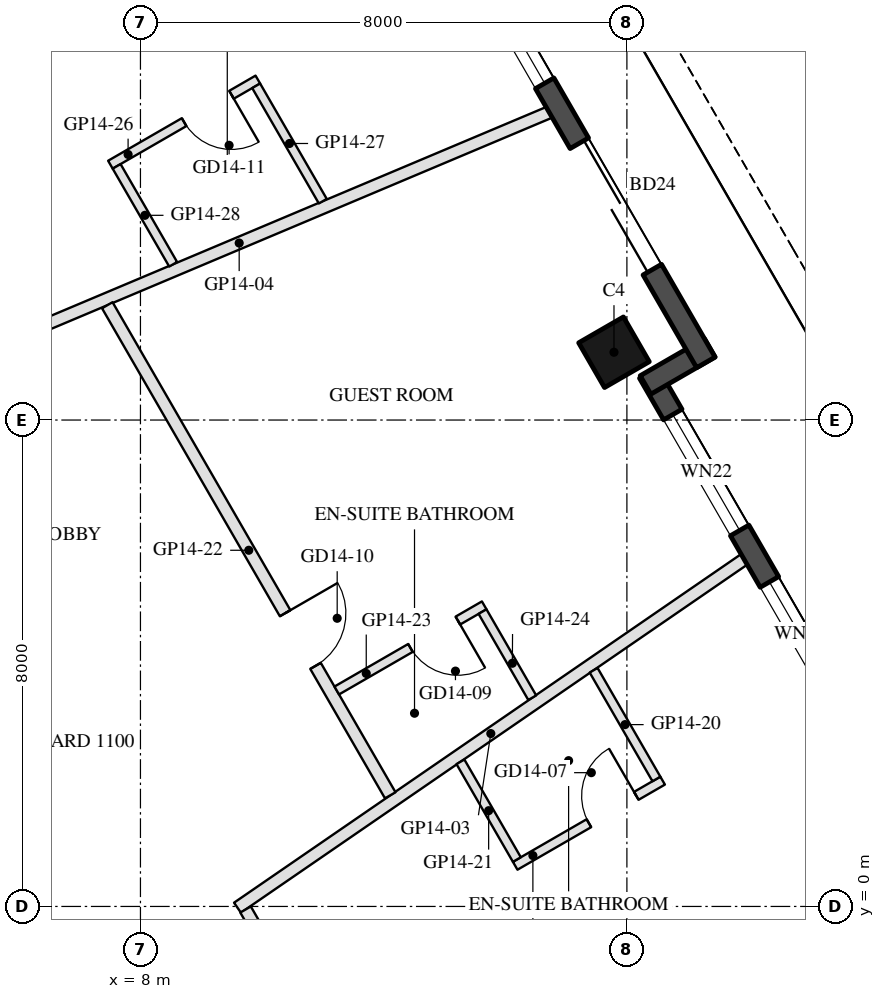
"""IFC4 building model, lengths in metres.
Left out: names, types, materials, properties, quantities, classifications, styles, units other than length and angle.
Written with IfcOpenShell. Run it as: python <this file> out.ifc"""

import sys

from ifc_helpers import new_model, si_unit, direction, frame, frame_2d, origin, origin_2d, place, context, subcontext, project, spatial, rectangle, hollow_rectangle, extrude, element, fill, save


model = new_model("IFC4")
c1 = context("Model", 3, precision=1e-05, world=origin(), true_north=direction((0.0, 1.0)))
c2 = subcontext(c1, "Body", "Model", "MODEL_VIEW")
j1 = project(units=[si_unit("LENGTHUNIT", "METRE"), si_unit("PLANEANGLEUNIT", "RADIAN")], contexts=[c1])
p1 = place(None, origin())
s1 = spatial("IfcSite", under=j1, at=p1, CompositionType="ELEMENT")
p2 = place(p1, origin())
s2 = spatial("IfcBuilding", under=s1, at=p2, CompositionType="ELEMENT")
p3 = place(p2, frame((0.0, 0.0, 165.1)))
s3 = spatial("IfcBuildingStorey", under=s2, at=p3, CompositionType="ELEMENT", Elevation=165.1)
p4 = place(p3, frame((15.788, 9.115, 0.0), z_axis=(0.0, 0.0, 1.0), x_axis=(-0.5, 0.866025403784, 0.0)))
e1 = element("IfcColumn", 1, at=p4, inside=s3, PredefinedType="COLUMN", context=c2, shape_type="SweptSolid", body=[
    extrude(hollow_rectangle(XDim=0.85, YDim=0.85, WallThickness=0.04, at=origin_2d()), origin(), (0.0, 0.0, 1.0), 3.7),
])
p5 = place(p3, frame((19.729, 2.938, 0.0), z_axis=(0.0, 0.0, 1.0), x_axis=(-0.499976430342, 0.866039011305, 0.0)))
e2 = element("IfcWall", 2, at=p5, inside=s3, PredefinedType="SOLIDWALL", context=c2, shape_type="SweptSolid", body=[
    extrude(rectangle(XDim=6.74, YDim=0.35, at=frame_2d((3.37, 0.0))), origin(), (0.0, 0.0, 1.0), 3.55),
])
p6 = place(p5, frame((0.77, 0.0, 0.3)))
e3 = element("IfcOpeningElement", 3, at=p6, cuts=e2, PredefinedType="OPENING", context=c2, shape_type="SweptSolid", body=[
    extrude(rectangle(XDim=2.0, YDim=2.65, at=frame_2d((1.0, 1.325))), frame((0.0, 0.185, 0.0), z_axis=(0.0, -1.0, 0.0), x_axis=(1.0, 0.0, 0.0)), (0.0, 0.0, 1.0), 0.37),
])
p7 = place(p5, frame((3.749, 0.0, 0.3)))
e4 = element("IfcOpeningElement", 4, at=p7, cuts=e2, PredefinedType="OPENING", context=c2, shape_type="SweptSolid", body=[
    extrude(rectangle(XDim=2.2, YDim=2.65, at=frame_2d((1.1, 1.325))), frame((0.0, 0.185, 0.0), z_axis=(0.0, -1.0, 0.0), x_axis=(1.0, 0.0, 0.0)), (0.0, 0.0, 1.0), 0.37),
])
p8 = place(p3, frame((16.306, 8.577, 0.0), z_axis=(0.0, 0.0, 1.0), x_axis=(0.866092288191, 0.499884134912, 0.0)))
e5 = element("IfcWall", 5, at=p8, inside=s3, PredefinedType="SOLIDWALL", context=c2, shape_type="SweptSolid", body=[
    extrude(rectangle(XDim=1.22, YDim=0.35, at=frame_2d((0.61, 0.0))), origin(), (0.0, 0.0, 1.0), 3.55),
])
p9 = place(p3, frame((17.299, 8.948, 0.0), z_axis=(0.0, 0.0, 1.0), x_axis=(-0.500010041276, 0.866019606374, 0.0)))
e6 = element("IfcWall", 6, at=p9, inside=s3, PredefinedType="SOLIDWALL", context=c2, shape_type="SweptSolid", body=[
    extrude(rectangle(XDim=9.7, YDim=0.35, at=frame_2d((4.85, 0.0))), origin(), (0.0, 0.0, 1.0), 3.55),
])
p10 = place(p9, frame((1.762, 0.0, 0.0)))
e7 = element("IfcOpeningElement", 7, at=p10, cuts=e6, PredefinedType="OPENING", context=c2, shape_type="SweptSolid", body=[
    extrude(rectangle(XDim=2.4, YDim=2.4, at=frame_2d((1.2, 1.2))), frame((0.0, 0.185, 0.0), z_axis=(0.0, -1.0, 0.0), x_axis=(1.0, 0.0, 0.0)), (0.0, 0.0, 1.0), 0.37),
])
p11 = place(p9, frame((5.301, 0.0, 0.3)))
e8 = element("IfcOpeningElement", 8, at=p11, cuts=e6, PredefinedType="OPENING", context=c2, shape_type="SweptSolid", body=[
    extrude(rectangle(XDim=2.7, YDim=2.65, at=frame_2d((1.35, 1.325))), frame((0.0, 0.185, 0.0), z_axis=(0.0, -1.0, 0.0), x_axis=(1.0, 0.0, 0.0)), (0.0, 0.0, 1.0), 0.37),
])
p12 = place(p3, frame((17.928, 5.708, 0.0), z_axis=(0.0, 0.0, 1.0), x_axis=(-0.824041924199, -0.566528822887, 0.0)))
e9 = element("IfcWall", 9, at=p12, inside=s3, PredefinedType="PARTITIONING", context=c2, shape_type="SweptSolid", body=[
    extrude(rectangle(XDim=10.111, YDim=0.2, at=frame_2d((5.056, 0.0))), origin(), (0.0, 0.0, 1.0), 2.95),
])
p13 = place(p3, frame((14.722, 13.061, 0.0), z_axis=(0.0, 0.0, 1.0), x_axis=(-0.921447968583, -0.388501790465, 0.0)))
e10 = element("IfcWall", 10, at=p13, inside=s3, PredefinedType="PARTITIONING", context=c2, shape_type="SweptSolid", body=[
    extrude(rectangle(XDim=11.066, YDim=0.2, at=frame_2d((5.533, 0.0))), origin(), (0.0, 0.0, 1.0), 2.95),
])
p14 = place(p3, frame((9.729, -0.051, 0.0), z_axis=(0.0, 0.0, 1.0), x_axis=(0.500005339912, -0.866022320763, 0.0)))
e11 = element("IfcWall", 11, at=p14, inside=s3, PredefinedType="PARTITIONING", context=c2, shape_type="SweptSolid", body=[
    extrude(rectangle(XDim=5.08, YDim=0.2, at=frame_2d((2.54, 0.0))), origin(), (0.0, 0.0, 1.0), 2.95),
])
p15 = place(p14, frame((2.04, 0.0, 0.0)))
e12 = element("IfcOpeningElement", 12, at=p15, cuts=e11, PredefinedType="OPENING", context=c2, shape_type="SweptSolid", body=[
    extrude(rectangle(XDim=1.0, YDim=2.1, at=frame_2d((0.5, 1.05))), frame((0.0, 0.11, 0.0), z_axis=(0.0, -1.0, 0.0), x_axis=(1.0, 0.0, 0.0)), (0.0, 0.0, 1.0), 0.22),
])
p16 = place(p3, frame((14.163, 0.669, 0.0), z_axis=(0.0, 0.0, 1.0), x_axis=(0.866056369097, 0.49994636267, 0.0)))
e13 = element("IfcWall", 13, at=p16, inside=s3, PredefinedType="PARTITIONING", context=c2, shape_type="SweptSolid", body=[
    extrude(rectangle(XDim=2.8, YDim=0.15, at=frame_2d((1.4, 0.0))), origin(), (0.0, 0.0, 1.0), 3.55),
])
p17 = place(p16, frame((1.4, 0.0, 0.0)))
e14 = element("IfcOpeningElement", 14, at=p17, cuts=e13, PredefinedType="OPENING", context=c2, shape_type="SweptSolid", body=[
    extrude(rectangle(XDim=0.9, YDim=2.1, at=frame_2d((0.45, 1.05))), frame((0.0, 0.085, 0.0), z_axis=(0.0, -1.0, 0.0), x_axis=(1.0, 0.0, 0.0)), (0.0, 0.0, 1.0), 0.17),
])
p18 = place(p3, frame((16.485, 2.096, 0.0), z_axis=(0.0, 0.0, 1.0), x_axis=(-0.499991955492, 0.866030048233, 0.0)))
e15 = element("IfcWall", 15, at=p18, inside=s3, PredefinedType="PARTITIONING", context=c2, shape_type="SweptSolid", body=[
    extrude(rectangle(XDim=2.065, YDim=0.15, at=frame_2d((1.032, 0.0))), origin(), (0.0, 0.0, 1.0), 3.55),
])
p19 = place(p3, frame((14.19, 0.771, 0.0), z_axis=(0.0, 0.0, 1.0), x_axis=(-0.499972951856, 0.866041019474, 0.0)))
e16 = element("IfcWall", 16, at=p19, inside=s3, PredefinedType="PARTITIONING", context=c2, shape_type="SweptSolid", body=[
    extrude(rectangle(XDim=1.856, YDim=0.15, at=frame_2d((0.928, 0.0))), origin(), (0.0, 0.0, 1.0), 3.55),
])
p20 = place(p3, frame((7.455, 9.888, 0.0), z_axis=(0.0, 0.0, 1.0), x_axis=(0.499995688794, -0.866027892846, 0.0)))
e17 = element("IfcWall", 17, at=p20, inside=s3, PredefinedType="PARTITIONING", context=c2, shape_type="SweptSolid", body=[
    extrude(rectangle(XDim=9.307, YDim=0.2, at=frame_2d((4.654, 0.0))), origin(), (0.0, 0.0, 1.0), 2.95),
])
p21 = place(p20, frame((5.849, 0.0, 0.0)))
e18 = element("IfcOpeningElement", 18, at=p21, cuts=e17, PredefinedType="OPENING", context=c2, shape_type="SweptSolid", body=[
    extrude(rectangle(XDim=1.0, YDim=2.1, at=frame_2d((0.5, 1.05))), frame((0.0, 0.11, 0.0), z_axis=(0.0, -1.0, 0.0), x_axis=(1.0, 0.0, 0.0)), (0.0, 0.0, 1.0), 0.22),
])
p22 = place(p3, frame((13.653, 4.952, 0.0), z_axis=(0.0, 0.0, 1.0), x_axis=(-0.866034573852, -0.49998411664, 0.0)))
e19 = element("IfcWall", 19, at=p22, inside=s3, PredefinedType="PARTITIONING", context=c2, shape_type="SweptSolid", body=[
    extrude(rectangle(XDim=2.8, YDim=0.15, at=frame_2d((1.4, 0.0))), origin(), (0.0, 0.0, 1.0), 3.55),
])
p23 = place(p22, frame((0.5, 0.0, 0.0)))
e20 = element("IfcOpeningElement", 20, at=p23, cuts=e19, PredefinedType="OPENING", context=c2, shape_type="SweptSolid", body=[
    extrude(rectangle(XDim=0.9, YDim=2.1, at=frame_2d((0.45, 1.05))), frame((0.0, 0.085, 0.0), z_axis=(0.0, -1.0, 0.0), x_axis=(1.0, 0.0, 0.0)), (0.0, 0.0, 1.0), 0.17),
])
p24 = place(p3, frame((14.443, 3.433, 0.0), z_axis=(0.0, 0.0, 1.0), x_axis=(-0.499976608306, 0.866038908564, 0.0)))
e21 = element("IfcWall", 21, at=p24, inside=s3, PredefinedType="PARTITIONING", context=c2, shape_type="SweptSolid", body=[
    extrude(rectangle(XDim=1.635, YDim=0.15, at=frame_2d((0.818, 0.0))), origin(), (0.0, 0.0, 1.0), 2.95),
])
p25 = place(p3, frame((9.931, 13.6, 0.0), z_axis=(0.0, 0.0, 1.0), x_axis=(-0.866034573852, -0.49998411664, 0.0)))
e22 = element("IfcWall", 22, at=p25, inside=s3, PredefinedType="PARTITIONING", context=c2, shape_type="SweptSolid", body=[
    extrude(rectangle(XDim=2.8, YDim=0.15, at=frame_2d((1.4, 0.0))), origin(), (0.0, 0.0, 1.0), 3.55),
])
p26 = place(p25, frame((0.5, 0.0, 0.0)))
e23 = element("IfcOpeningElement", 23, at=p26, cuts=e22, PredefinedType="OPENING", context=c2, shape_type="SweptSolid", body=[
    extrude(rectangle(XDim=0.9, YDim=2.1, at=frame_2d((0.45, 1.05))), frame((0.0, 0.085, 0.0), z_axis=(0.0, -1.0, 0.0), x_axis=(1.0, 0.0, 0.0)), (0.0, 0.0, 1.0), 0.17),
])
p27 = place(p3, frame((10.999, 11.6, 0.0), z_axis=(0.0, 0.0, 1.0), x_axis=(-0.499937856693, 0.866061279267, 0.0)))
e24 = element("IfcWall", 24, at=p27, inside=s3, PredefinedType="PARTITIONING", context=c2, shape_type="SweptSolid", body=[
    extrude(rectangle(XDim=2.191, YDim=0.15, at=frame_2d((1.096, 0.0))), origin(), (0.0, 0.0, 1.0), 3.55),
])
p28 = place(p3, frame((8.538, 10.562, 0.0), z_axis=(0.0, 0.0, 1.0), x_axis=(-0.500036928615, 0.866004081989, 0.0)))
e25 = element("IfcWall", 25, at=p28, inside=s3, PredefinedType="PARTITIONING", context=c2, shape_type="SweptSolid", body=[
    extrude(rectangle(XDim=1.859, YDim=0.15, at=frame_2d((0.93, 0.0))), origin(), (0.0, 0.0, 1.0), 3.55),
])
p29 = place(p6, origin())
e26 = element("IfcWindow", 26, at=p29, inside=s3, PartitioningType="SINGLE_PANEL", PredefinedType="WINDOW", context=c2, shape_type="SweptSolid", body=[
    extrude(rectangle(XDim=2.0, YDim=2.65, at=frame_2d((1.0, 1.325))), frame((0.0, 0.03, 0.0), z_axis=(0.0, -1.0, 0.0), x_axis=(1.0, 0.0, 0.0)), (0.0, 0.0, 1.0), 0.06),
])
fill(e3, e26)
p30 = place(p7, origin())
e27 = element("IfcWindow", 27, at=p30, inside=s3, PartitioningType="SINGLE_PANEL", PredefinedType="WINDOW", context=c2, shape_type="SweptSolid", body=[
    extrude(rectangle(XDim=2.2, YDim=2.65, at=frame_2d((1.1, 1.325))), frame((0.0, 0.03, 0.0), z_axis=(0.0, -1.0, 0.0), x_axis=(1.0, 0.0, 0.0)), (0.0, 0.0, 1.0), 0.06),
])
fill(e4, e27)
p31 = place(p10, frame((2.4, 0.0, 0.0), z_axis=(0.0, 0.0, 1.0), x_axis=(-1.0, 0.0, 0.0)))
e28 = element("IfcDoor", 28, at=p31, inside=s3, OperationType="SLIDING_TO_LEFT", PredefinedType="DOOR", context=c2, shape_type="SweptSolid", body=[
    extrude(rectangle(XDim=2.4, YDim=2.4, at=frame_2d((1.2, 1.2))), frame((0.0, 0.025, 0.0), z_axis=(0.0, -1.0, 0.0), x_axis=(1.0, 0.0, 0.0)), (0.0, 0.0, 1.0), 0.05),
])
fill(e7, e28)
p32 = place(p11, origin())
e29 = element("IfcWindow", 29, at=p32, inside=s3, PartitioningType="SINGLE_PANEL", PredefinedType="WINDOW", context=c2, shape_type="SweptSolid", body=[
    extrude(rectangle(XDim=2.7, YDim=2.65, at=frame_2d((1.35, 1.325))), frame((0.0, 0.03, 0.0), z_axis=(0.0, -1.0, 0.0), x_axis=(1.0, 0.0, 0.0)), (0.0, 0.0, 1.0), 0.06),
])
fill(e8, e29)
p33 = place(p17, origin())
e30 = element("IfcDoor", 30, at=p33, inside=s3, OperationType="SINGLE_SWING_RIGHT", PredefinedType="DOOR", context=c2, shape_type="SweptSolid", body=[
    extrude(rectangle(XDim=0.9, YDim=2.1, at=frame_2d((0.45, 1.05))), frame((0.0, 0.025, 0.0), z_axis=(0.0, -1.0, 0.0), x_axis=(1.0, 0.0, 0.0)), (0.0, 0.0, 1.0), 0.05),
])
fill(e14, e30)
p34 = place(p23, origin())
e31 = element("IfcDoor", 31, at=p34, inside=s3, OperationType="SINGLE_SWING_LEFT", PredefinedType="DOOR", context=c2, shape_type="SweptSolid", body=[
    extrude(rectangle(XDim=0.9, YDim=2.1, at=frame_2d((0.45, 1.05))), frame((0.0, 0.025, 0.0), z_axis=(0.0, -1.0, 0.0), x_axis=(1.0, 0.0, 0.0)), (0.0, 0.0, 1.0), 0.05),
])
fill(e20, e31)
p35 = place(p21, origin())
e32 = element("IfcDoor", 32, at=p35, inside=s3, OperationType="SINGLE_SWING_LEFT", PredefinedType="DOOR", context=c2, shape_type="SweptSolid", body=[
    extrude(rectangle(XDim=1.0, YDim=2.1, at=frame_2d((0.5, 1.05))), frame((0.0, 0.025, 0.0), z_axis=(0.0, -1.0, 0.0), x_axis=(1.0, 0.0, 0.0)), (0.0, 0.0, 1.0), 0.05),
])
fill(e18, e32)
p36 = place(p26, origin())
e33 = element("IfcDoor", 33, at=p36, inside=s3, OperationType="SINGLE_SWING_LEFT", PredefinedType="DOOR", context=c2, shape_type="SweptSolid", body=[
    extrude(rectangle(XDim=0.9, YDim=2.1, at=frame_2d((0.45, 1.05))), frame((0.0, 0.025, 0.0), z_axis=(0.0, -1.0, 0.0), x_axis=(1.0, 0.0, 0.0)), (0.0, 0.0, 1.0), 0.05),
])
fill(e23, e33)
save(model, sys.argv[1])
